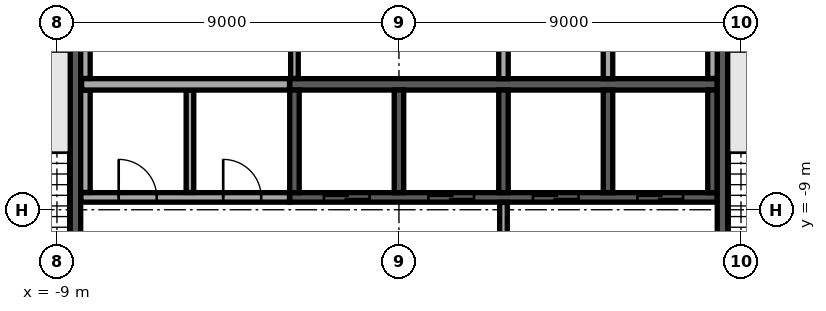
"""IFC4 building model, lengths in metres.
Left out: names, types, materials, properties, quantities, classifications, styles, units other than length and angle.
Written with IfcOpenShell. Run it as: python <this file> out.ifc"""

import sys

from ifc_helpers import new_model, si_unit, direction, frame, frame_2d, origin, place, context, subcontext, project, spatial, rectangle, extrude, element, fill, save


model = new_model("IFC4")
c1 = context("Model", 3, precision=1e-05, world=origin(), true_north=direction((0.0, 1.0)))
c2 = subcontext(c1, "Body", "Model", "MODEL_VIEW")
j1 = project(units=[si_unit("LENGTHUNIT", "METRE"), si_unit("PLANEANGLEUNIT", "RADIAN")], contexts=[c1])
p1 = place(None, origin())
s1 = spatial("IfcSite", under=j1, at=p1, CompositionType="ELEMENT")
p2 = place(p1, origin())
s2 = spatial("IfcBuilding", under=s1, at=p2, CompositionType="ELEMENT")
p3 = place(p2, frame((0.0, 0.0, 262.9)))
s3 = spatial("IfcBuildingStorey", under=s2, at=p3, CompositionType="ELEMENT", Elevation=262.9)
p4 = place(p3, frame((-2.875, -5.7, 0.0), z_axis=(0.0, 0.0, 1.0), x_axis=(1.0, 0.0, 0.0)))
e1 = element("IfcWall", 1, at=p4, inside=s3, PredefinedType="SOLIDWALL", context=c2, shape_type="SweptSolid", body=[
    extrude(rectangle(XDim=11.25, YDim=0.3, at=frame_2d((5.625, 0.0))), origin(), (0.0, 0.0, 1.0), 3.64),
])
for number, where, z_axis, x_axis in (
    (2, (2.75, -5.55, 0.0), (0.0, 0.0, 1.0), (0.0, 1.0, 0.0)),
    (3, (5.5, -5.55, 0.0), (0.0, 0.0, 1.0), (0.0, 1.0, 0.0)),
):
    element("IfcWall", number, at=place(p3, frame(where, z_axis=z_axis, x_axis=x_axis)), inside=s3, PredefinedType="SOLIDWALL", context=c2, shape_type="SweptSolid", body=[
        extrude(rectangle(XDim=2.7, YDim=0.25, at=frame_2d((1.35, 0.0))), origin(), (0.0, 0.0, 1.0), 3.64),
    ])
p5 = place(p3, frame((-2.875, -8.675, 0.0), z_axis=(0.0, 0.0, 1.0), x_axis=(1.0, 0.0, 0.0)))
e4 = element("IfcWall", 4, at=p5, inside=s3, PredefinedType="SOLIDWALL", context=c2, shape_type="SweptSolid", body=[
    extrude(rectangle(XDim=11.25, YDim=0.25, at=frame_2d((5.625, 0.0))), origin(), (0.0, 0.0, 1.0), 3.64),
])
p6 = place(p5, frame((0.9, 0.0, 0.0)))
e5 = element("IfcOpeningElement", 5, at=p6, cuts=e4, PredefinedType="OPENING", context=c2, shape_type="SweptSolid", body=[
    extrude(rectangle(XDim=1.2, YDim=2.1, at=frame_2d((0.6, 1.05))), frame((0.0, 0.135, 0.0), z_axis=(0.0, -1.0, 0.0), x_axis=(1.0, 0.0, 0.0)), (0.0, 0.0, 1.0), 0.27),
])
p7 = place(p5, frame((3.65, 0.0, 0.0)))
e6 = element("IfcOpeningElement", 6, at=p7, cuts=e4, PredefinedType="OPENING", context=c2, shape_type="SweptSolid", body=[
    extrude(rectangle(XDim=1.2, YDim=2.1, at=frame_2d((0.6, 1.05))), frame((0.0, 0.135, 0.0), z_axis=(0.0, -1.0, 0.0), x_axis=(1.0, 0.0, 0.0)), (0.0, 0.0, 1.0), 0.27),
])
p8 = place(p5, frame((6.4, 0.0, 0.0)))
e7 = element("IfcOpeningElement", 7, at=p8, cuts=e4, PredefinedType="OPENING", context=c2, shape_type="SweptSolid", body=[
    extrude(rectangle(XDim=1.2, YDim=2.1, at=frame_2d((0.6, 1.05))), frame((0.0, 0.135, 0.0), z_axis=(0.0, -1.0, 0.0), x_axis=(1.0, 0.0, 0.0)), (0.0, 0.0, 1.0), 0.27),
])
p9 = place(p5, frame((9.15, 0.0, 0.0)))
e8 = element("IfcOpeningElement", 8, at=p9, cuts=e4, PredefinedType="OPENING", context=c2, shape_type="SweptSolid", body=[
    extrude(rectangle(XDim=1.2, YDim=2.1, at=frame_2d((0.6, 1.05))), frame((0.0, 0.135, 0.0), z_axis=(0.0, -1.0, 0.0), x_axis=(1.0, 0.0, 0.0)), (0.0, 0.0, 1.0), 0.27),
])
for number, where, z_axis, x_axis in (
    (9, (-2.75, -8.55, 0.0), (0.0, 0.0, 1.0), (0.0, 1.0, 0.0)),
    (10, (0.0, -8.55, 0.0), (0.0, 0.0, 1.0), (0.0, 1.0, 0.0)),
    (11, (2.75, -8.55, 0.0), (0.0, 0.0, 1.0), (0.0, 1.0, 0.0)),
    (12, (5.5, -8.55, 0.0), (0.0, 0.0, 1.0), (0.0, 1.0, 0.0)),
    (13, (8.25, -8.55, 0.0), (0.0, 0.0, 1.0), (0.0, 1.0, 0.0)),
):
    element("IfcWall", number, at=place(p3, frame(where, z_axis=z_axis, x_axis=x_axis)), inside=s3, PredefinedType="SOLIDWALL", context=c2, shape_type="SweptSolid", body=[
        extrude(rectangle(XDim=2.7, YDim=0.25, at=frame_2d((1.35, 0.0))), origin(), (0.0, 0.0, 1.0), 3.64),
    ])
p10 = place(p3, frame((-8.512, -4.55, 0.0), z_axis=(0.0, 0.0, 1.0), x_axis=(0.0, -1.0, 0.0)))
e14 = element("IfcWall", 14, at=p10, inside=s3, PredefinedType="SOLIDWALL", context=c2, shape_type="SweptSolid", body=[
    extrude(rectangle(XDim=7.25, YDim=0.275, at=frame_2d((3.625, 0.0))), origin(), (0.0, 0.0, 1.0), 3.64),
])
p11 = place(p10, frame((6.0, 0.0, 0.0)))
e15 = element("IfcOpeningElement", 15, at=p11, cuts=e14, PredefinedType="OPENING", context=c2, shape_type="SweptSolid", body=[
    extrude(rectangle(XDim=1.0, YDim=2.1, at=frame_2d((0.5, 1.05))), frame((0.0, 0.147, 0.0), z_axis=(0.0, -1.0, 0.0), x_axis=(1.0, 0.0, 0.0)), (0.0, 0.0, 1.0), 0.295),
])
p12 = place(p3, frame((8.512, -4.55, 0.0), z_axis=(0.0, 0.0, 1.0), x_axis=(0.0, -1.0, 0.0)))
e16 = element("IfcWall", 16, at=p12, inside=s3, PredefinedType="SOLIDWALL", context=c2, shape_type="SweptSolid", body=[
    extrude(rectangle(XDim=7.25, YDim=0.275, at=frame_2d((3.625, 0.0))), origin(), (0.0, 0.0, 1.0), 3.64),
])
p13 = place(p12, frame((6.0, 0.0, 0.0)))
e17 = element("IfcOpeningElement", 17, at=p13, cuts=e16, PredefinedType="OPENING", context=c2, shape_type="SweptSolid", body=[
    extrude(rectangle(XDim=1.0, YDim=2.1, at=frame_2d((0.5, 1.05))), frame((0.0, 0.147, 0.0), z_axis=(0.0, -1.0, 0.0), x_axis=(1.0, 0.0, 0.0)), (0.0, 0.0, 1.0), 0.295),
])
p14 = place(p3, frame((2.75, -11.795, 0.0), z_axis=(0.0, 0.0, 1.0), x_axis=(0.0, 1.0, 0.0)))
e18 = element("IfcWall", 18, at=p14, inside=s3, PredefinedType="PARTITIONING", context=c2, shape_type="SweptSolid", body=[
    extrude(rectangle(XDim=2.99, YDim=0.2, at=frame_2d((1.495, 0.0))), origin(), (0.0, 0.0, 1.0), 3.64),
])
p15 = place(p3, frame((-8.37, -8.675, 0.0), z_axis=(0.0, 0.0, 1.0), x_axis=(1.0, 0.0, 0.0)))
e19 = element("IfcWall", 19, at=p15, inside=s3, PredefinedType="PARTITIONING", context=c2, shape_type="SweptSolid", body=[
    extrude(rectangle(XDim=5.49, YDim=0.25, at=frame_2d((2.745, 0.0))), origin(), (0.0, 0.0, 1.0), 3.64),
])
p16 = place(p15, frame((0.995, 0.0, 0.0)))
e20 = element("IfcOpeningElement", 20, at=p16, cuts=e19, PredefinedType="OPENING", context=c2, shape_type="SweptSolid", body=[
    extrude(rectangle(XDim=1.0, YDim=2.1, at=frame_2d((0.5, 1.05))), frame((0.0, 0.135, 0.0), z_axis=(0.0, -1.0, 0.0), x_axis=(1.0, 0.0, 0.0)), (0.0, 0.0, 1.0), 0.27),
])
p17 = place(p15, frame((3.745, 0.0, 0.0)))
e21 = element("IfcOpeningElement", 21, at=p17, cuts=e19, PredefinedType="OPENING", context=c2, shape_type="SweptSolid", body=[
    extrude(rectangle(XDim=1.0, YDim=2.1, at=frame_2d((0.5, 1.05))), frame((0.0, 0.135, 0.0), z_axis=(0.0, -1.0, 0.0), x_axis=(1.0, 0.0, 0.0)), (0.0, 0.0, 1.0), 0.27),
])
p18 = place(p3, frame((-8.25, -8.545, 0.0), z_axis=(0.0, 0.0, 1.0), x_axis=(0.0, 1.0, 0.0)))
e22 = element("IfcWall", 22, at=p18, inside=s3, PredefinedType="PARTITIONING", context=c2, shape_type="SweptSolid", body=[
    extrude(rectangle(XDim=2.69, YDim=0.25, at=frame_2d((1.345, 0.0))), origin(), (0.0, 0.0, 1.0), 3.64),
])
p19 = place(p3, frame((-5.5, -8.545, 0.0), z_axis=(0.0, 0.0, 1.0), x_axis=(0.0, 1.0, 0.0)))
e23 = element("IfcWall", 23, at=p19, inside=s3, PredefinedType="PARTITIONING", context=c2, shape_type="SweptSolid", body=[
    extrude(rectangle(XDim=2.69, YDim=0.2, at=frame_2d((1.345, 0.0))), origin(), (0.0, 0.0, 1.0), 3.64),
])
p20 = place(p3, frame((-8.35, -5.7, 0.0), z_axis=(0.0, 0.0, 1.0), x_axis=(1.0, 0.0, 0.0)))
e24 = element("IfcWall", 24, at=p20, inside=s3, PredefinedType="PARTITIONING", context=c2, shape_type="SweptSolid", body=[
    extrude(rectangle(XDim=5.47, YDim=0.3, at=frame_2d((2.735, 0.0))), origin(), (0.0, 0.0, 1.0), 3.64),
])
p21 = place(p3, frame((-8.25, -5.545, 0.0), z_axis=(0.0, 0.0, 1.0), x_axis=(0.0, 1.0, 0.0)))
e25 = element("IfcWall", 25, at=p21, inside=s3, PredefinedType="PARTITIONING", context=c2, shape_type="SweptSolid", body=[
    extrude(rectangle(XDim=2.69, YDim=0.25, at=frame_2d((1.345, 0.0))), origin(), (0.0, 0.0, 1.0), 3.64),
])
p22 = place(p3, frame((-2.75, -5.545, 0.0), z_axis=(0.0, 0.0, 1.0), x_axis=(0.0, 1.0, 0.0)))
e26 = element("IfcWall", 26, at=p22, inside=s3, PredefinedType="PARTITIONING", context=c2, shape_type="SweptSolid", body=[
    extrude(rectangle(XDim=2.69, YDim=0.2, at=frame_2d((1.345, 0.0))), origin(), (0.0, 0.0, 1.0), 3.64),
])
p23 = place(p3, frame((8.25, -5.545, 0.0), z_axis=(0.0, 0.0, 1.0), x_axis=(0.0, 1.0, 0.0)))
e27 = element("IfcWall", 27, at=p23, inside=s3, PredefinedType="PARTITIONING", context=c2, shape_type="SweptSolid", body=[
    extrude(rectangle(XDim=2.69, YDim=0.25, at=frame_2d((1.345, 0.0))), origin(), (0.0, 0.0, 1.0), 3.64),
])
p24 = place(p3, frame((-8.015, 32.917, 0.0), z_axis=(0.0, 0.0, 1.0), x_axis=(-0.500001675963, -0.866024436165, 0.0)))
e28 = element("IfcWall", 28, at=p24, inside=s3, PredefinedType="STANDARD", context=c2, shape_type="SweptSolid", body=[
    extrude(rectangle(XDim=48.843, YDim=0.6, at=frame_2d((24.421, 0.0))), origin(), (0.0, 0.0, 1.0), 3.64),
])
p25 = place(p24, frame((1.22, 0.0, 0.9)))
e29 = element("IfcOpeningElement", 29, at=p25, cuts=e28, PredefinedType="OPENING", context=c2, shape_type="SweptSolid", body=[
    extrude(rectangle(XDim=2.0, YDim=2.1, at=frame_2d((1.0, 1.05))), frame((0.0, 0.31, 0.0), z_axis=(0.0, -1.0, 0.0), x_axis=(1.0, 0.0, 0.0)), (0.0, 0.0, 1.0), 0.62),
])
p26 = place(p24, frame((5.66, 0.0, 0.9)))
e30 = element("IfcOpeningElement", 30, at=p26, cuts=e28, PredefinedType="OPENING", context=c2, shape_type="SweptSolid", body=[
    extrude(rectangle(XDim=2.0, YDim=2.1, at=frame_2d((1.0, 1.05))), frame((0.0, 0.31, 0.0), z_axis=(0.0, -1.0, 0.0), x_axis=(1.0, 0.0, 0.0)), (0.0, 0.0, 1.0), 0.62),
])
p27 = place(p24, frame((10.101, 0.0, 0.9)))
e31 = element("IfcOpeningElement", 31, at=p27, cuts=e28, PredefinedType="OPENING", context=c2, shape_type="SweptSolid", body=[
    extrude(rectangle(XDim=2.0, YDim=2.1, at=frame_2d((1.0, 1.05))), frame((0.0, 0.31, 0.0), z_axis=(0.0, -1.0, 0.0), x_axis=(1.0, 0.0, 0.0)), (0.0, 0.0, 1.0), 0.62),
])
p28 = place(p24, frame((14.541, 0.0, 0.9)))
e32 = element("IfcOpeningElement", 32, at=p28, cuts=e28, PredefinedType="OPENING", context=c2, shape_type="SweptSolid", body=[
    extrude(rectangle(XDim=2.0, YDim=2.1, at=frame_2d((1.0, 1.05))), frame((0.0, 0.31, 0.0), z_axis=(0.0, -1.0, 0.0), x_axis=(1.0, 0.0, 0.0)), (0.0, 0.0, 1.0), 0.62),
])
p29 = place(p24, frame((18.981, 0.0, 0.9)))
e33 = element("IfcOpeningElement", 33, at=p29, cuts=e28, PredefinedType="OPENING", context=c2, shape_type="SweptSolid", body=[
    extrude(rectangle(XDim=2.0, YDim=2.1, at=frame_2d((1.0, 1.05))), frame((0.0, 0.31, 0.0), z_axis=(0.0, -1.0, 0.0), x_axis=(1.0, 0.0, 0.0)), (0.0, 0.0, 1.0), 0.62),
])
p30 = place(p24, frame((23.422, 0.0, 0.9)))
e34 = element("IfcOpeningElement", 34, at=p30, cuts=e28, PredefinedType="OPENING", context=c2, shape_type="SweptSolid", body=[
    extrude(rectangle(XDim=2.0, YDim=2.1, at=frame_2d((1.0, 1.05))), frame((0.0, 0.31, 0.0), z_axis=(0.0, -1.0, 0.0), x_axis=(1.0, 0.0, 0.0)), (0.0, 0.0, 1.0), 0.62),
])
p31 = place(p24, frame((27.862, 0.0, 0.9)))
e35 = element("IfcOpeningElement", 35, at=p31, cuts=e28, PredefinedType="OPENING", context=c2, shape_type="SweptSolid", body=[
    extrude(rectangle(XDim=2.0, YDim=2.1, at=frame_2d((1.0, 1.05))), frame((0.0, 0.31, 0.0), z_axis=(0.0, -1.0, 0.0), x_axis=(1.0, 0.0, 0.0)), (0.0, 0.0, 1.0), 0.62),
])
p32 = place(p24, frame((32.302, 0.0, 0.9)))
e36 = element("IfcOpeningElement", 36, at=p32, cuts=e28, PredefinedType="OPENING", context=c2, shape_type="SweptSolid", body=[
    extrude(rectangle(XDim=2.0, YDim=2.1, at=frame_2d((1.0, 1.05))), frame((0.0, 0.31, 0.0), z_axis=(0.0, -1.0, 0.0), x_axis=(1.0, 0.0, 0.0)), (0.0, 0.0, 1.0), 0.62),
])
p33 = place(p24, frame((36.742, 0.0, 0.9)))
e37 = element("IfcOpeningElement", 37, at=p33, cuts=e28, PredefinedType="OPENING", context=c2, shape_type="SweptSolid", body=[
    extrude(rectangle(XDim=2.0, YDim=2.1, at=frame_2d((1.0, 1.05))), frame((0.0, 0.31, 0.0), z_axis=(0.0, -1.0, 0.0), x_axis=(1.0, 0.0, 0.0)), (0.0, 0.0, 1.0), 0.62),
])
p34 = place(p24, frame((41.183, 0.0, 0.9)))
e38 = element("IfcOpeningElement", 38, at=p34, cuts=e28, PredefinedType="OPENING", context=c2, shape_type="SweptSolid", body=[
    extrude(rectangle(XDim=2.0, YDim=2.1, at=frame_2d((1.0, 1.05))), frame((0.0, 0.31, 0.0), z_axis=(0.0, -1.0, 0.0), x_axis=(1.0, 0.0, 0.0)), (0.0, 0.0, 1.0), 0.62),
])
p35 = place(p24, frame((45.623, 0.0, 0.9)))
e39 = element("IfcOpeningElement", 39, at=p35, cuts=e28, PredefinedType="OPENING", context=c2, shape_type="SweptSolid", body=[
    extrude(rectangle(XDim=2.0, YDim=2.1, at=frame_2d((1.0, 1.05))), frame((0.0, 0.31, 0.0), z_axis=(0.0, -1.0, 0.0), x_axis=(1.0, 0.0, 0.0)), (0.0, 0.0, 1.0), 0.62),
])
p36 = place(p3, frame((8.094, -32.782, 0.0), z_axis=(0.0, 0.0, 1.0), x_axis=(0.499997945818, 0.866026589763, 0.0)))
e40 = element("IfcWall", 40, at=p36, inside=s3, PredefinedType="STANDARD", context=c2, shape_type="SweptSolid", body=[
    extrude(rectangle(XDim=48.686, YDim=0.6, at=frame_2d((24.343, 0.0))), origin(), (0.0, 0.0, 1.0), 3.64),
])
p37 = place(p36, frame((1.213, 0.0, 0.9)))
e41 = element("IfcOpeningElement", 41, at=p37, cuts=e40, PredefinedType="OPENING", context=c2, shape_type="SweptSolid", body=[
    extrude(rectangle(XDim=2.0, YDim=2.1, at=frame_2d((1.0, 1.05))), frame((0.0, 0.31, 0.0), z_axis=(0.0, -1.0, 0.0), x_axis=(1.0, 0.0, 0.0)), (0.0, 0.0, 1.0), 0.62),
])
p38 = place(p36, frame((5.639, 0.0, 0.9)))
e42 = element("IfcOpeningElement", 42, at=p38, cuts=e40, PredefinedType="OPENING", context=c2, shape_type="SweptSolid", body=[
    extrude(rectangle(XDim=2.0, YDim=2.1, at=frame_2d((1.0, 1.05))), frame((0.0, 0.31, 0.0), z_axis=(0.0, -1.0, 0.0), x_axis=(1.0, 0.0, 0.0)), (0.0, 0.0, 1.0), 0.62),
])
p39 = place(p36, frame((10.065, 0.0, 0.9)))
e43 = element("IfcOpeningElement", 43, at=p39, cuts=e40, PredefinedType="OPENING", context=c2, shape_type="SweptSolid", body=[
    extrude(rectangle(XDim=2.0, YDim=2.1, at=frame_2d((1.0, 1.05))), frame((0.0, 0.31, 0.0), z_axis=(0.0, -1.0, 0.0), x_axis=(1.0, 0.0, 0.0)), (0.0, 0.0, 1.0), 0.62),
])
p40 = place(p36, frame((14.491, 0.0, 0.9)))
e44 = element("IfcOpeningElement", 44, at=p40, cuts=e40, PredefinedType="OPENING", context=c2, shape_type="SweptSolid", body=[
    extrude(rectangle(XDim=2.0, YDim=2.1, at=frame_2d((1.0, 1.05))), frame((0.0, 0.31, 0.0), z_axis=(0.0, -1.0, 0.0), x_axis=(1.0, 0.0, 0.0)), (0.0, 0.0, 1.0), 0.62),
])
p41 = place(p36, frame((18.917, 0.0, 0.9)))
e45 = element("IfcOpeningElement", 45, at=p41, cuts=e40, PredefinedType="OPENING", context=c2, shape_type="SweptSolid", body=[
    extrude(rectangle(XDim=2.0, YDim=2.1, at=frame_2d((1.0, 1.05))), frame((0.0, 0.31, 0.0), z_axis=(0.0, -1.0, 0.0), x_axis=(1.0, 0.0, 0.0)), (0.0, 0.0, 1.0), 0.62),
])
p42 = place(p36, frame((23.343, 0.0, 0.9)))
e46 = element("IfcOpeningElement", 46, at=p42, cuts=e40, PredefinedType="OPENING", context=c2, shape_type="SweptSolid", body=[
    extrude(rectangle(XDim=2.0, YDim=2.1, at=frame_2d((1.0, 1.05))), frame((0.0, 0.31, 0.0), z_axis=(0.0, -1.0, 0.0), x_axis=(1.0, 0.0, 0.0)), (0.0, 0.0, 1.0), 0.62),
])
p43 = place(p36, frame((27.769, 0.0, 0.9)))
e47 = element("IfcOpeningElement", 47, at=p43, cuts=e40, PredefinedType="OPENING", context=c2, shape_type="SweptSolid", body=[
    extrude(rectangle(XDim=2.0, YDim=2.1, at=frame_2d((1.0, 1.05))), frame((0.0, 0.31, 0.0), z_axis=(0.0, -1.0, 0.0), x_axis=(1.0, 0.0, 0.0)), (0.0, 0.0, 1.0), 0.62),
])
p44 = place(p36, frame((32.195, 0.0, 0.9)))
e48 = element("IfcOpeningElement", 48, at=p44, cuts=e40, PredefinedType="OPENING", context=c2, shape_type="SweptSolid", body=[
    extrude(rectangle(XDim=2.0, YDim=2.1, at=frame_2d((1.0, 1.05))), frame((0.0, 0.31, 0.0), z_axis=(0.0, -1.0, 0.0), x_axis=(1.0, 0.0, 0.0)), (0.0, 0.0, 1.0), 0.62),
])
p45 = place(p36, frame((36.621, 0.0, 0.9)))
e49 = element("IfcOpeningElement", 49, at=p45, cuts=e40, PredefinedType="OPENING", context=c2, shape_type="SweptSolid", body=[
    extrude(rectangle(XDim=2.0, YDim=2.1, at=frame_2d((1.0, 1.05))), frame((0.0, 0.31, 0.0), z_axis=(0.0, -1.0, 0.0), x_axis=(1.0, 0.0, 0.0)), (0.0, 0.0, 1.0), 0.62),
])
p46 = place(p36, frame((41.047, 0.0, 0.9)))
e50 = element("IfcOpeningElement", 50, at=p46, cuts=e40, PredefinedType="OPENING", context=c2, shape_type="SweptSolid", body=[
    extrude(rectangle(XDim=2.0, YDim=2.1, at=frame_2d((1.0, 1.05))), frame((0.0, 0.31, 0.0), z_axis=(0.0, -1.0, 0.0), x_axis=(1.0, 0.0, 0.0)), (0.0, 0.0, 1.0), 0.62),
])
p47 = place(p36, frame((45.473, 0.0, 0.9)))
e51 = element("IfcOpeningElement", 51, at=p47, cuts=e40, PredefinedType="OPENING", context=c2, shape_type="SweptSolid", body=[
    extrude(rectangle(XDim=2.0, YDim=2.1, at=frame_2d((1.0, 1.05))), frame((0.0, 0.31, 0.0), z_axis=(0.0, -1.0, 0.0), x_axis=(1.0, 0.0, 0.0)), (0.0, 0.0, 1.0), 0.62),
])
p48 = place(p3, frame((-26.744, -7.073, 0.0), z_axis=(0.0, 0.0, 1.0), x_axis=(0.866020890374, -0.500007817374, 0.0)))
e52 = element("IfcWall", 52, at=p48, inside=s3, PredefinedType="PARTITIONING", context=c2, shape_type="SweptSolid", body=[
    extrude(rectangle(XDim=39.324, YDim=0.15, at=frame_2d((19.662, 0.0))), origin(), (0.0, 0.0, 1.0), 3.04),
])
p49 = place(p48, frame((14.505, 0.0, 0.0)))
e53 = element("IfcOpeningElement", 53, at=p49, cuts=e52, PredefinedType="OPENING", context=c2, shape_type="SweptSolid", body=[
    extrude(rectangle(XDim=1.0, YDim=2.1, at=frame_2d((0.5, 1.05))), frame((0.0, 0.085, 0.0), z_axis=(0.0, -1.0, 0.0), x_axis=(1.0, 0.0, 0.0)), (0.0, 0.0, 1.0), 0.17),
])
p50 = place(p48, frame((22.632, 0.0, 0.0)))
e54 = element("IfcOpeningElement", 54, at=p50, cuts=e52, PredefinedType="OPENING", context=c2, shape_type="SweptSolid", body=[
    extrude(rectangle(XDim=1.0, YDim=2.1, at=frame_2d((0.5, 1.05))), frame((0.0, 0.085, 0.0), z_axis=(0.0, -1.0, 0.0), x_axis=(1.0, 0.0, 0.0)), (0.0, 0.0, 1.0), 0.17),
])
p51 = place(p48, frame((36.852, 0.0, 0.0)))
e55 = element("IfcOpeningElement", 55, at=p51, cuts=e52, PredefinedType="OPENING", context=c2, shape_type="SweptSolid", body=[
    extrude(rectangle(XDim=1.8, YDim=2.1, at=frame_2d((0.9, 1.05))), frame((0.0, 0.085, 0.0), z_axis=(0.0, -1.0, 0.0), x_axis=(1.0, 0.0, 0.0)), (0.0, 0.0, 1.0), 0.17),
])
p52 = place(p48, frame((29.852, 0.0, 0.0)))
e56 = element("IfcOpeningElement", 56, at=p52, cuts=e52, PredefinedType="OPENING", context=c2, shape_type="SweptSolid", body=[
    extrude(rectangle(XDim=1.0, YDim=2.1, at=frame_2d((0.5, 1.05))), frame((0.0, 0.085, 0.0), z_axis=(0.0, -1.0, 0.0), x_axis=(1.0, 0.0, 0.0)), (0.0, 0.0, 1.0), 0.17),
])
p53 = place(p6, origin())
e57 = element("IfcDoor", 57, at=p53, inside=s3, OperationType="DOUBLE_DOOR_SLIDING", PredefinedType="DOOR", context=c2, shape_type="SweptSolid", body=[
    extrude(rectangle(XDim=1.2, YDim=2.1, at=frame_2d((0.6, 1.05))), frame((0.0, 0.025, 0.0), z_axis=(0.0, -1.0, 0.0), x_axis=(1.0, 0.0, 0.0)), (0.0, 0.0, 1.0), 0.05),
])
fill(e5, e57)
p54 = place(p7, origin())
e58 = element("IfcDoor", 58, at=p54, inside=s3, OperationType="DOUBLE_DOOR_SLIDING", PredefinedType="DOOR", context=c2, shape_type="SweptSolid", body=[
    extrude(rectangle(XDim=1.2, YDim=2.1, at=frame_2d((0.6, 1.05))), frame((0.0, 0.025, 0.0), z_axis=(0.0, -1.0, 0.0), x_axis=(1.0, 0.0, 0.0)), (0.0, 0.0, 1.0), 0.05),
])
fill(e6, e58)
p55 = place(p8, origin())
e59 = element("IfcDoor", 59, at=p55, inside=s3, OperationType="DOUBLE_DOOR_SLIDING", PredefinedType="DOOR", context=c2, shape_type="SweptSolid", body=[
    extrude(rectangle(XDim=1.2, YDim=2.1, at=frame_2d((0.6, 1.05))), frame((0.0, 0.025, 0.0), z_axis=(0.0, -1.0, 0.0), x_axis=(1.0, 0.0, 0.0)), (0.0, 0.0, 1.0), 0.05),
])
fill(e7, e59)
p56 = place(p9, origin())
e60 = element("IfcDoor", 60, at=p56, inside=s3, OperationType="DOUBLE_DOOR_SLIDING", PredefinedType="DOOR", context=c2, shape_type="SweptSolid", body=[
    extrude(rectangle(XDim=1.2, YDim=2.1, at=frame_2d((0.6, 1.05))), frame((0.0, 0.025, 0.0), z_axis=(0.0, -1.0, 0.0), x_axis=(1.0, 0.0, 0.0)), (0.0, 0.0, 1.0), 0.05),
])
fill(e8, e60)
p57 = place(p16, origin())
e61 = element("IfcDoor", 61, at=p57, inside=s3, OperationType="SINGLE_SWING_LEFT", PredefinedType="DOOR", context=c2, shape_type="SweptSolid", body=[
    extrude(rectangle(XDim=1.0, YDim=2.1, at=frame_2d((0.5, 1.05))), frame((0.0, 0.025, 0.0), z_axis=(0.0, -1.0, 0.0), x_axis=(1.0, 0.0, 0.0)), (0.0, 0.0, 1.0), 0.05),
])
fill(e20, e61)
p58 = place(p17, origin())
e62 = element("IfcDoor", 62, at=p58, inside=s3, OperationType="SINGLE_SWING_LEFT", PredefinedType="DOOR", context=c2, shape_type="SweptSolid", body=[
    extrude(rectangle(XDim=1.0, YDim=2.1, at=frame_2d((0.5, 1.05))), frame((0.0, 0.025, 0.0), z_axis=(0.0, -1.0, 0.0), x_axis=(1.0, 0.0, 0.0)), (0.0, 0.0, 1.0), 0.05),
])
fill(e21, e62)
save(model, sys.argv[1])
